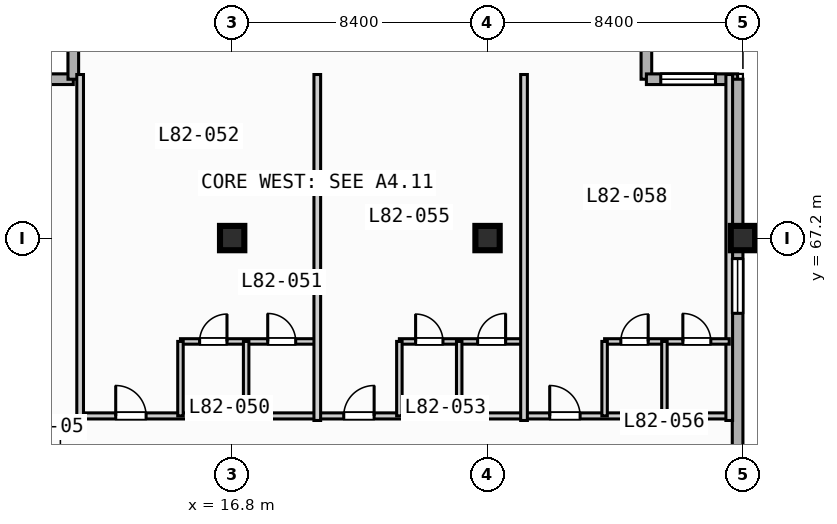
"""IFC4 building model, lengths in metres.
Left out: names, types, materials, properties, quantities, classifications, styles, units other than length and angle.
Written with IfcOpenShell. Run it as: python <this file> out.ifc"""

import sys

from ifc_helpers import new_model, si_unit, direction, frame, frame_2d, origin, origin_2d, place, context, subcontext, project, spatial, rectangle, extrude, element, fill, save


model = new_model("IFC4")
c1 = context("Model", 3, precision=1e-05, world=origin(), true_north=direction((0.0, 1.0)))
c2 = subcontext(c1, "Body", "Model", "MODEL_VIEW")
j1 = project(units=[si_unit("LENGTHUNIT", "METRE"), si_unit("PLANEANGLEUNIT", "RADIAN")], contexts=[c1])
p1 = place(None, origin())
s1 = spatial("IfcSite", under=j1, at=p1, CompositionType="ELEMENT")
p2 = place(p1, origin())
s2 = spatial("IfcBuilding", under=s1, at=p2, CompositionType="ELEMENT")
p3 = place(p2, frame((0.0, 0.0, 332.0)))
s3 = spatial("IfcBuildingStorey", under=s2, at=p3, CompositionType="ELEMENT", Elevation=332.0)
for number, where, z_axis, x_axis in (
    (1, (16.8, 67.2, 0.0), (0.0, 0.0, 1.0), (1.0, 0.0, 0.0)),
    (2, (25.2, 67.2, 0.0), (0.0, 0.0, 1.0), (1.0, 0.0, 0.0)),
    (3, (33.6, 67.2, 0.0), (0.0, 0.0, 1.0), (1.0, 0.0, 0.0)),
):
    element("IfcColumn", number, at=place(p3, frame(where, z_axis=z_axis, x_axis=x_axis)), inside=s3, PredefinedType="COLUMN", context=c2, shape_type="SweptSolid", body=[
        extrude(rectangle(XDim=0.8, YDim=0.8, at=origin_2d()), origin(), (0.0, 0.0, 1.0), 3.9),
    ])
for number, where, z_axis, x_axis in (
    (4, (8.575, 72.425, 0.0), (0.0, 0.0, 1.0), (1.0, 0.0, 0.0)),
    (5, (11.575, 72.425, 0.0), (0.0, 0.0, 1.0), (0.0, 1.0, 0.0)),
    (6, (30.425, 75.425, 0.0), (0.0, 0.0, 1.0), (0.0, -1.0, 0.0)),
):
    element("IfcWall", number, at=place(p3, frame(where, z_axis=z_axis, x_axis=x_axis)), inside=s3, PredefinedType="STANDARD", context=c2, shape_type="SweptSolid", body=[
        extrude(rectangle(XDim=3.0, YDim=0.35, at=frame_2d((1.5, 0.0))), origin(), (0.0, 0.0, 1.0), 3.67),
    ])
p4 = place(p3, frame((30.425, 72.425, 0.0), z_axis=(0.0, 0.0, 1.0), x_axis=(1.0, 0.0, 0.0)))
e7 = element("IfcWall", 7, at=p4, inside=s3, PredefinedType="STANDARD", context=c2, shape_type="SweptSolid", body=[
    extrude(rectangle(XDim=3.0, YDim=0.35, at=frame_2d((1.5, 0.0))), origin(), (0.0, 0.0, 1.0), 3.67),
])
p5 = place(p4, frame((0.472, 0.0, 0.85)))
e8 = element("IfcOpeningElement", 8, at=p5, cuts=e7, PredefinedType="OPENING", context=c2, shape_type="SweptSolid", body=[
    extrude(rectangle(XDim=1.8, YDim=1.8, at=frame_2d((0.9, 0.9))), frame((0.0, 0.185, 0.0), z_axis=(0.0, -1.0, 0.0), x_axis=(1.0, 0.0, 0.0)), (0.0, 0.0, 1.0), 0.37),
])
p6 = place(p3, frame((33.425, 72.425, 0.0), z_axis=(0.0, 0.0, 1.0), x_axis=(0.0, -1.0, 0.0)))
e9 = element("IfcWall", 9, at=p6, inside=s3, PredefinedType="STANDARD", context=c2, shape_type="SweptSolid", body=[
    extrude(rectangle(XDim=39.0, YDim=0.35, at=frame_2d((19.5, 0.0))), origin(), (0.0, 0.0, 1.0), 3.67),
])
p7 = place(p6, frame((5.9, 0.0, 0.85)))
e10 = element("IfcOpeningElement", 10, at=p7, cuts=e9, PredefinedType="OPENING", context=c2, shape_type="SweptSolid", body=[
    extrude(rectangle(XDim=1.8, YDim=1.8, at=frame_2d((0.9, 0.9))), frame((0.0, 0.185, 0.0), z_axis=(0.0, -1.0, 0.0), x_axis=(1.0, 0.0, 0.0)), (0.0, 0.0, 1.0), 0.37),
])
p8 = place(p3, frame((11.8, 61.35, 0.0), z_axis=(0.0, 0.0, 1.0), x_axis=(1.0, 0.0, 0.0)))
e11 = element("IfcWall", 11, at=p8, inside=s3, PredefinedType="PARTITIONING", context=c2, shape_type="SweptSolid", body=[
    extrude(rectangle(XDim=21.35, YDim=0.2, at=frame_2d((10.675, 0.0))), origin(), (0.0, 0.0, 1.0), 3.67),
])
p9 = place(p8, frame((1.17, 0.0, 0.0)))
e12 = element("IfcOpeningElement", 12, at=p9, cuts=e11, PredefinedType="OPENING", context=c2, shape_type="SweptSolid", body=[
    extrude(rectangle(XDim=1.0, YDim=2.15, at=frame_2d((0.5, 1.075))), frame((0.0, 0.11, 0.0), z_axis=(0.0, -1.0, 0.0), x_axis=(1.0, 0.0, 0.0)), (0.0, 0.0, 1.0), 0.22),
])
p10 = place(p8, frame((8.67, 0.0, 0.0)))
e13 = element("IfcOpeningElement", 13, at=p10, cuts=e11, PredefinedType="OPENING", context=c2, shape_type="SweptSolid", body=[
    extrude(rectangle(XDim=1.0, YDim=2.15, at=frame_2d((0.5, 1.075))), frame((0.0, 0.11, 0.0), z_axis=(0.0, -1.0, 0.0), x_axis=(1.0, 0.0, 0.0)), (0.0, 0.0, 1.0), 0.22),
])
p11 = place(p8, frame((15.445, 0.0, 0.0)))
e14 = element("IfcOpeningElement", 14, at=p11, cuts=e11, PredefinedType="OPENING", context=c2, shape_type="SweptSolid", body=[
    extrude(rectangle(XDim=1.0, YDim=2.15, at=frame_2d((0.5, 1.075))), frame((0.0, 0.11, 0.0), z_axis=(0.0, -1.0, 0.0), x_axis=(1.0, 0.0, 0.0)), (0.0, 0.0, 1.0), 0.22),
])
p12 = place(p3, frame((11.8, 61.2, 0.0), z_axis=(0.0, 0.0, 1.0), x_axis=(0.0, 1.0, 0.0)))
e15 = element("IfcWall", 15, at=p12, inside=s3, PredefinedType="PARTITIONING", context=c2, shape_type="SweptSolid", body=[
    extrude(rectangle(XDim=11.38, YDim=0.22, at=frame_2d((5.69, 0.0))), origin(), (0.0, 0.0, 1.0), 3.67),
])
p13 = place(p3, frame((15.1, 63.8, 0.0), z_axis=(0.0, 0.0, 1.0), x_axis=(1.0, 0.0, 0.0)))
e16 = element("IfcWall", 16, at=p13, inside=s3, PredefinedType="PLUMBINGWALL", context=c2, shape_type="SweptSolid", body=[
    extrude(rectangle(XDim=4.5, YDim=0.18, at=frame_2d((2.25, 0.0))), origin(), (0.0, 0.0, 1.0), 3.67),
])
p14 = place(p13, frame((0.63, 0.0, 0.0)))
e17 = element("IfcOpeningElement", 17, at=p14, cuts=e16, PredefinedType="OPENING", context=c2, shape_type="SweptSolid", body=[
    extrude(rectangle(XDim=0.9, YDim=2.1, at=frame_2d((0.45, 1.05))), frame((0.0, 0.1, 0.0), z_axis=(0.0, -1.0, 0.0), x_axis=(1.0, 0.0, 0.0)), (0.0, 0.0, 1.0), 0.2),
])
p15 = place(p13, frame((2.87, 0.0, 0.0)))
e18 = element("IfcOpeningElement", 18, at=p15, cuts=e16, PredefinedType="OPENING", context=c2, shape_type="SweptSolid", body=[
    extrude(rectangle(XDim=0.92, YDim=2.1, at=frame_2d((0.46, 1.05))), frame((0.0, 0.1, 0.0), z_axis=(0.0, -1.0, 0.0), x_axis=(1.0, 0.0, 0.0)), (0.0, 0.0, 1.0), 0.2),
])
for number, where, z_axis, x_axis in (
    (19, (15.1, 61.35, 0.0), (0.0, 0.0, 1.0), (0.0, 1.0, 0.0)),
    (20, (17.26, 61.35, 0.0), (0.0, 0.0, 1.0), (0.0, 1.0, 0.0)),
):
    element("IfcWall", number, at=place(p3, frame(where, z_axis=z_axis, x_axis=x_axis)), inside=s3, PredefinedType="PLUMBINGWALL", context=c2, shape_type="SweptSolid", body=[
        extrude(rectangle(XDim=2.45, YDim=0.18, at=frame_2d((1.225, 0.0))), origin(), (0.0, 0.0, 1.0), 3.67),
    ])
p16 = place(p3, frame((19.6, 61.2, 0.0), z_axis=(0.0, 0.0, 1.0), x_axis=(0.0, 1.0, 0.0)))
e21 = element("IfcWall", 21, at=p16, inside=s3, PredefinedType="PARTITIONING", context=c2, shape_type="SweptSolid", body=[
    extrude(rectangle(XDim=11.38, YDim=0.22, at=frame_2d((5.69, 0.0))), origin(), (0.0, 0.0, 1.0), 3.67),
])
p17 = place(p3, frame((22.3, 63.8, 0.0), z_axis=(0.0, 0.0, 1.0), x_axis=(1.0, 0.0, 0.0)))
e22 = element("IfcWall", 22, at=p17, inside=s3, PredefinedType="PLUMBINGWALL", context=c2, shape_type="SweptSolid", body=[
    extrude(rectangle(XDim=4.1, YDim=0.18, at=frame_2d((2.05, 0.0))), origin(), (0.0, 0.0, 1.0), 3.67),
])
p18 = place(p17, frame((0.534, 0.0, 0.0)))
e23 = element("IfcOpeningElement", 23, at=p18, cuts=e22, PredefinedType="OPENING", context=c2, shape_type="SweptSolid", body=[
    extrude(rectangle(XDim=0.9, YDim=2.1, at=frame_2d((0.45, 1.05))), frame((0.0, 0.1, 0.0), z_axis=(0.0, -1.0, 0.0), x_axis=(1.0, 0.0, 0.0)), (0.0, 0.0, 1.0), 0.2),
])
p19 = place(p17, frame((2.574, 0.0, 0.0)))
e24 = element("IfcOpeningElement", 24, at=p19, cuts=e22, PredefinedType="OPENING", context=c2, shape_type="SweptSolid", body=[
    extrude(rectangle(XDim=0.92, YDim=2.1, at=frame_2d((0.46, 1.05))), frame((0.0, 0.1, 0.0), z_axis=(0.0, -1.0, 0.0), x_axis=(1.0, 0.0, 0.0)), (0.0, 0.0, 1.0), 0.2),
])
for number, where, z_axis, x_axis in (
    (25, (22.3, 61.35, 0.0), (0.0, 0.0, 1.0), (0.0, 1.0, 0.0)),
    (26, (24.268, 61.35, 0.0), (0.0, 0.0, 1.0), (0.0, 1.0, 0.0)),
):
    element("IfcWall", number, at=place(p3, frame(where, z_axis=z_axis, x_axis=x_axis)), inside=s3, PredefinedType="PLUMBINGWALL", context=c2, shape_type="SweptSolid", body=[
        extrude(rectangle(XDim=2.45, YDim=0.18, at=frame_2d((1.225, 0.0))), origin(), (0.0, 0.0, 1.0), 3.67),
    ])
for number, where, z_axis, x_axis in (
    (27, (26.4, 61.2, 0.0), (0.0, 0.0, 1.0), (0.0, 1.0, 0.0)),
    (28, (33.15, 61.2, 0.0), (0.0, 0.0, 1.0), (0.0, 1.0, 0.0)),
):
    element("IfcWall", number, at=place(p3, frame(where, z_axis=z_axis, x_axis=x_axis)), inside=s3, PredefinedType="PARTITIONING", context=c2, shape_type="SweptSolid", body=[
        extrude(rectangle(XDim=11.38, YDim=0.22, at=frame_2d((5.69, 0.0))), origin(), (0.0, 0.0, 1.0), 3.67),
    ])
p20 = place(p3, frame((29.05, 63.8, 0.0), z_axis=(0.0, 0.0, 1.0), x_axis=(1.0, 0.0, 0.0)))
e29 = element("IfcWall", 29, at=p20, inside=s3, PredefinedType="PLUMBINGWALL", context=c2, shape_type="SweptSolid", body=[
    extrude(rectangle(XDim=4.1, YDim=0.18, at=frame_2d((2.05, 0.0))), origin(), (0.0, 0.0, 1.0), 3.67),
])
p21 = place(p20, frame((0.534, 0.0, 0.0)))
e30 = element("IfcOpeningElement", 30, at=p21, cuts=e29, PredefinedType="OPENING", context=c2, shape_type="SweptSolid", body=[
    extrude(rectangle(XDim=0.9, YDim=2.1, at=frame_2d((0.45, 1.05))), frame((0.0, 0.1, 0.0), z_axis=(0.0, -1.0, 0.0), x_axis=(1.0, 0.0, 0.0)), (0.0, 0.0, 1.0), 0.2),
])
p22 = place(p20, frame((2.574, 0.0, 0.0)))
e31 = element("IfcOpeningElement", 31, at=p22, cuts=e29, PredefinedType="OPENING", context=c2, shape_type="SweptSolid", body=[
    extrude(rectangle(XDim=0.92, YDim=2.1, at=frame_2d((0.46, 1.05))), frame((0.0, 0.1, 0.0), z_axis=(0.0, -1.0, 0.0), x_axis=(1.0, 0.0, 0.0)), (0.0, 0.0, 1.0), 0.2),
])
for number, where, z_axis, x_axis in (
    (32, (29.05, 61.35, 0.0), (0.0, 0.0, 1.0), (0.0, 1.0, 0.0)),
    (33, (31.018, 61.35, 0.0), (0.0, 0.0, 1.0), (0.0, 1.0, 0.0)),
):
    element("IfcWall", number, at=place(p3, frame(where, z_axis=z_axis, x_axis=x_axis)), inside=s3, PredefinedType="PLUMBINGWALL", context=c2, shape_type="SweptSolid", body=[
        extrude(rectangle(XDim=2.45, YDim=0.18, at=frame_2d((1.225, 0.0))), origin(), (0.0, 0.0, 1.0), 3.67),
    ])
p23 = place(p5, origin())
e34 = element("IfcWindow", 34, at=p23, inside=s3, PartitioningType="SINGLE_PANEL", PredefinedType="WINDOW", context=c2, shape_type="SweptSolid", body=[
    extrude(rectangle(XDim=1.8, YDim=1.8, at=frame_2d((0.9, 0.9))), frame((0.0, 0.03, 0.0), z_axis=(0.0, -1.0, 0.0), x_axis=(1.0, 0.0, 0.0)), (0.0, 0.0, 1.0), 0.06),
])
fill(e8, e34)
p24 = place(p7, origin())
e35 = element("IfcWindow", 35, at=p24, inside=s3, PartitioningType="SINGLE_PANEL", PredefinedType="WINDOW", context=c2, shape_type="SweptSolid", body=[
    extrude(rectangle(XDim=1.8, YDim=1.8, at=frame_2d((0.9, 0.9))), frame((0.0, 0.03, 0.0), z_axis=(0.0, -1.0, 0.0), x_axis=(1.0, 0.0, 0.0)), (0.0, 0.0, 1.0), 0.06),
])
fill(e10, e35)
p25 = place(p9, origin())
e36 = element("IfcDoor", 36, at=p25, inside=s3, OperationType="SINGLE_SWING_LEFT", PredefinedType="DOOR", context=c2, shape_type="SweptSolid", body=[
    extrude(rectangle(XDim=1.0, YDim=2.15, at=frame_2d((0.5, 1.075))), frame((0.0, 0.025, 0.0), z_axis=(0.0, -1.0, 0.0), x_axis=(1.0, 0.0, 0.0)), (0.0, 0.0, 1.0), 0.05),
])
fill(e12, e36)
p26 = place(p10, origin())
e37 = element("IfcDoor", 37, at=p26, inside=s3, OperationType="SINGLE_SWING_RIGHT", PredefinedType="DOOR", context=c2, shape_type="SweptSolid", body=[
    extrude(rectangle(XDim=1.0, YDim=2.15, at=frame_2d((0.5, 1.075))), frame((0.0, 0.025, 0.0), z_axis=(0.0, -1.0, 0.0), x_axis=(1.0, 0.0, 0.0)), (0.0, 0.0, 1.0), 0.05),
])
fill(e13, e37)
p27 = place(p11, origin())
e38 = element("IfcDoor", 38, at=p27, inside=s3, OperationType="SINGLE_SWING_LEFT", PredefinedType="DOOR", context=c2, shape_type="SweptSolid", body=[
    extrude(rectangle(XDim=1.0, YDim=2.15, at=frame_2d((0.5, 1.075))), frame((0.0, 0.025, 0.0), z_axis=(0.0, -1.0, 0.0), x_axis=(1.0, 0.0, 0.0)), (0.0, 0.0, 1.0), 0.05),
])
fill(e14, e38)
p28 = place(p14, origin())
e39 = element("IfcDoor", 39, at=p28, inside=s3, OperationType="SINGLE_SWING_RIGHT", PredefinedType="DOOR", context=c2, shape_type="SweptSolid", body=[
    extrude(rectangle(XDim=0.9, YDim=2.1, at=frame_2d((0.45, 1.05))), frame((0.0, 0.025, 0.0), z_axis=(0.0, -1.0, 0.0), x_axis=(1.0, 0.0, 0.0)), (0.0, 0.0, 1.0), 0.05),
])
fill(e17, e39)
p29 = place(p15, origin())
e40 = element("IfcDoor", 40, at=p29, inside=s3, OperationType="SINGLE_SWING_LEFT", PredefinedType="DOOR", context=c2, shape_type="SweptSolid", body=[
    extrude(rectangle(XDim=0.92, YDim=2.1, at=frame_2d((0.46, 1.05))), frame((0.0, 0.025, 0.0), z_axis=(0.0, -1.0, 0.0), x_axis=(1.0, 0.0, 0.0)), (0.0, 0.0, 1.0), 0.05),
])
fill(e18, e40)
p30 = place(p18, origin())
e41 = element("IfcDoor", 41, at=p30, inside=s3, OperationType="SINGLE_SWING_LEFT", PredefinedType="DOOR", context=c2, shape_type="SweptSolid", body=[
    extrude(rectangle(XDim=0.9, YDim=2.1, at=frame_2d((0.45, 1.05))), frame((0.0, 0.025, 0.0), z_axis=(0.0, -1.0, 0.0), x_axis=(1.0, 0.0, 0.0)), (0.0, 0.0, 1.0), 0.05),
])
fill(e23, e41)
p31 = place(p19, origin())
e42 = element("IfcDoor", 42, at=p31, inside=s3, OperationType="SINGLE_SWING_RIGHT", PredefinedType="DOOR", context=c2, shape_type="SweptSolid", body=[
    extrude(rectangle(XDim=0.92, YDim=2.1, at=frame_2d((0.46, 1.05))), frame((0.0, 0.025, 0.0), z_axis=(0.0, -1.0, 0.0), x_axis=(1.0, 0.0, 0.0)), (0.0, 0.0, 1.0), 0.05),
])
fill(e24, e42)
p32 = place(p21, origin())
e43 = element("IfcDoor", 43, at=p32, inside=s3, OperationType="SINGLE_SWING_RIGHT", PredefinedType="DOOR", context=c2, shape_type="SweptSolid", body=[
    extrude(rectangle(XDim=0.9, YDim=2.1, at=frame_2d((0.45, 1.05))), frame((0.0, 0.025, 0.0), z_axis=(0.0, -1.0, 0.0), x_axis=(1.0, 0.0, 0.0)), (0.0, 0.0, 1.0), 0.05),
])
fill(e30, e43)
p33 = place(p22, origin())
e44 = element("IfcDoor", 44, at=p33, inside=s3, OperationType="SINGLE_SWING_LEFT", PredefinedType="DOOR", context=c2, shape_type="SweptSolid", body=[
    extrude(rectangle(XDim=0.92, YDim=2.1, at=frame_2d((0.46, 1.05))), frame((0.0, 0.025, 0.0), z_axis=(0.0, -1.0, 0.0), x_axis=(1.0, 0.0, 0.0)), (0.0, 0.0, 1.0), 0.05),
])
fill(e31, e44)
save(model, sys.argv[1])
